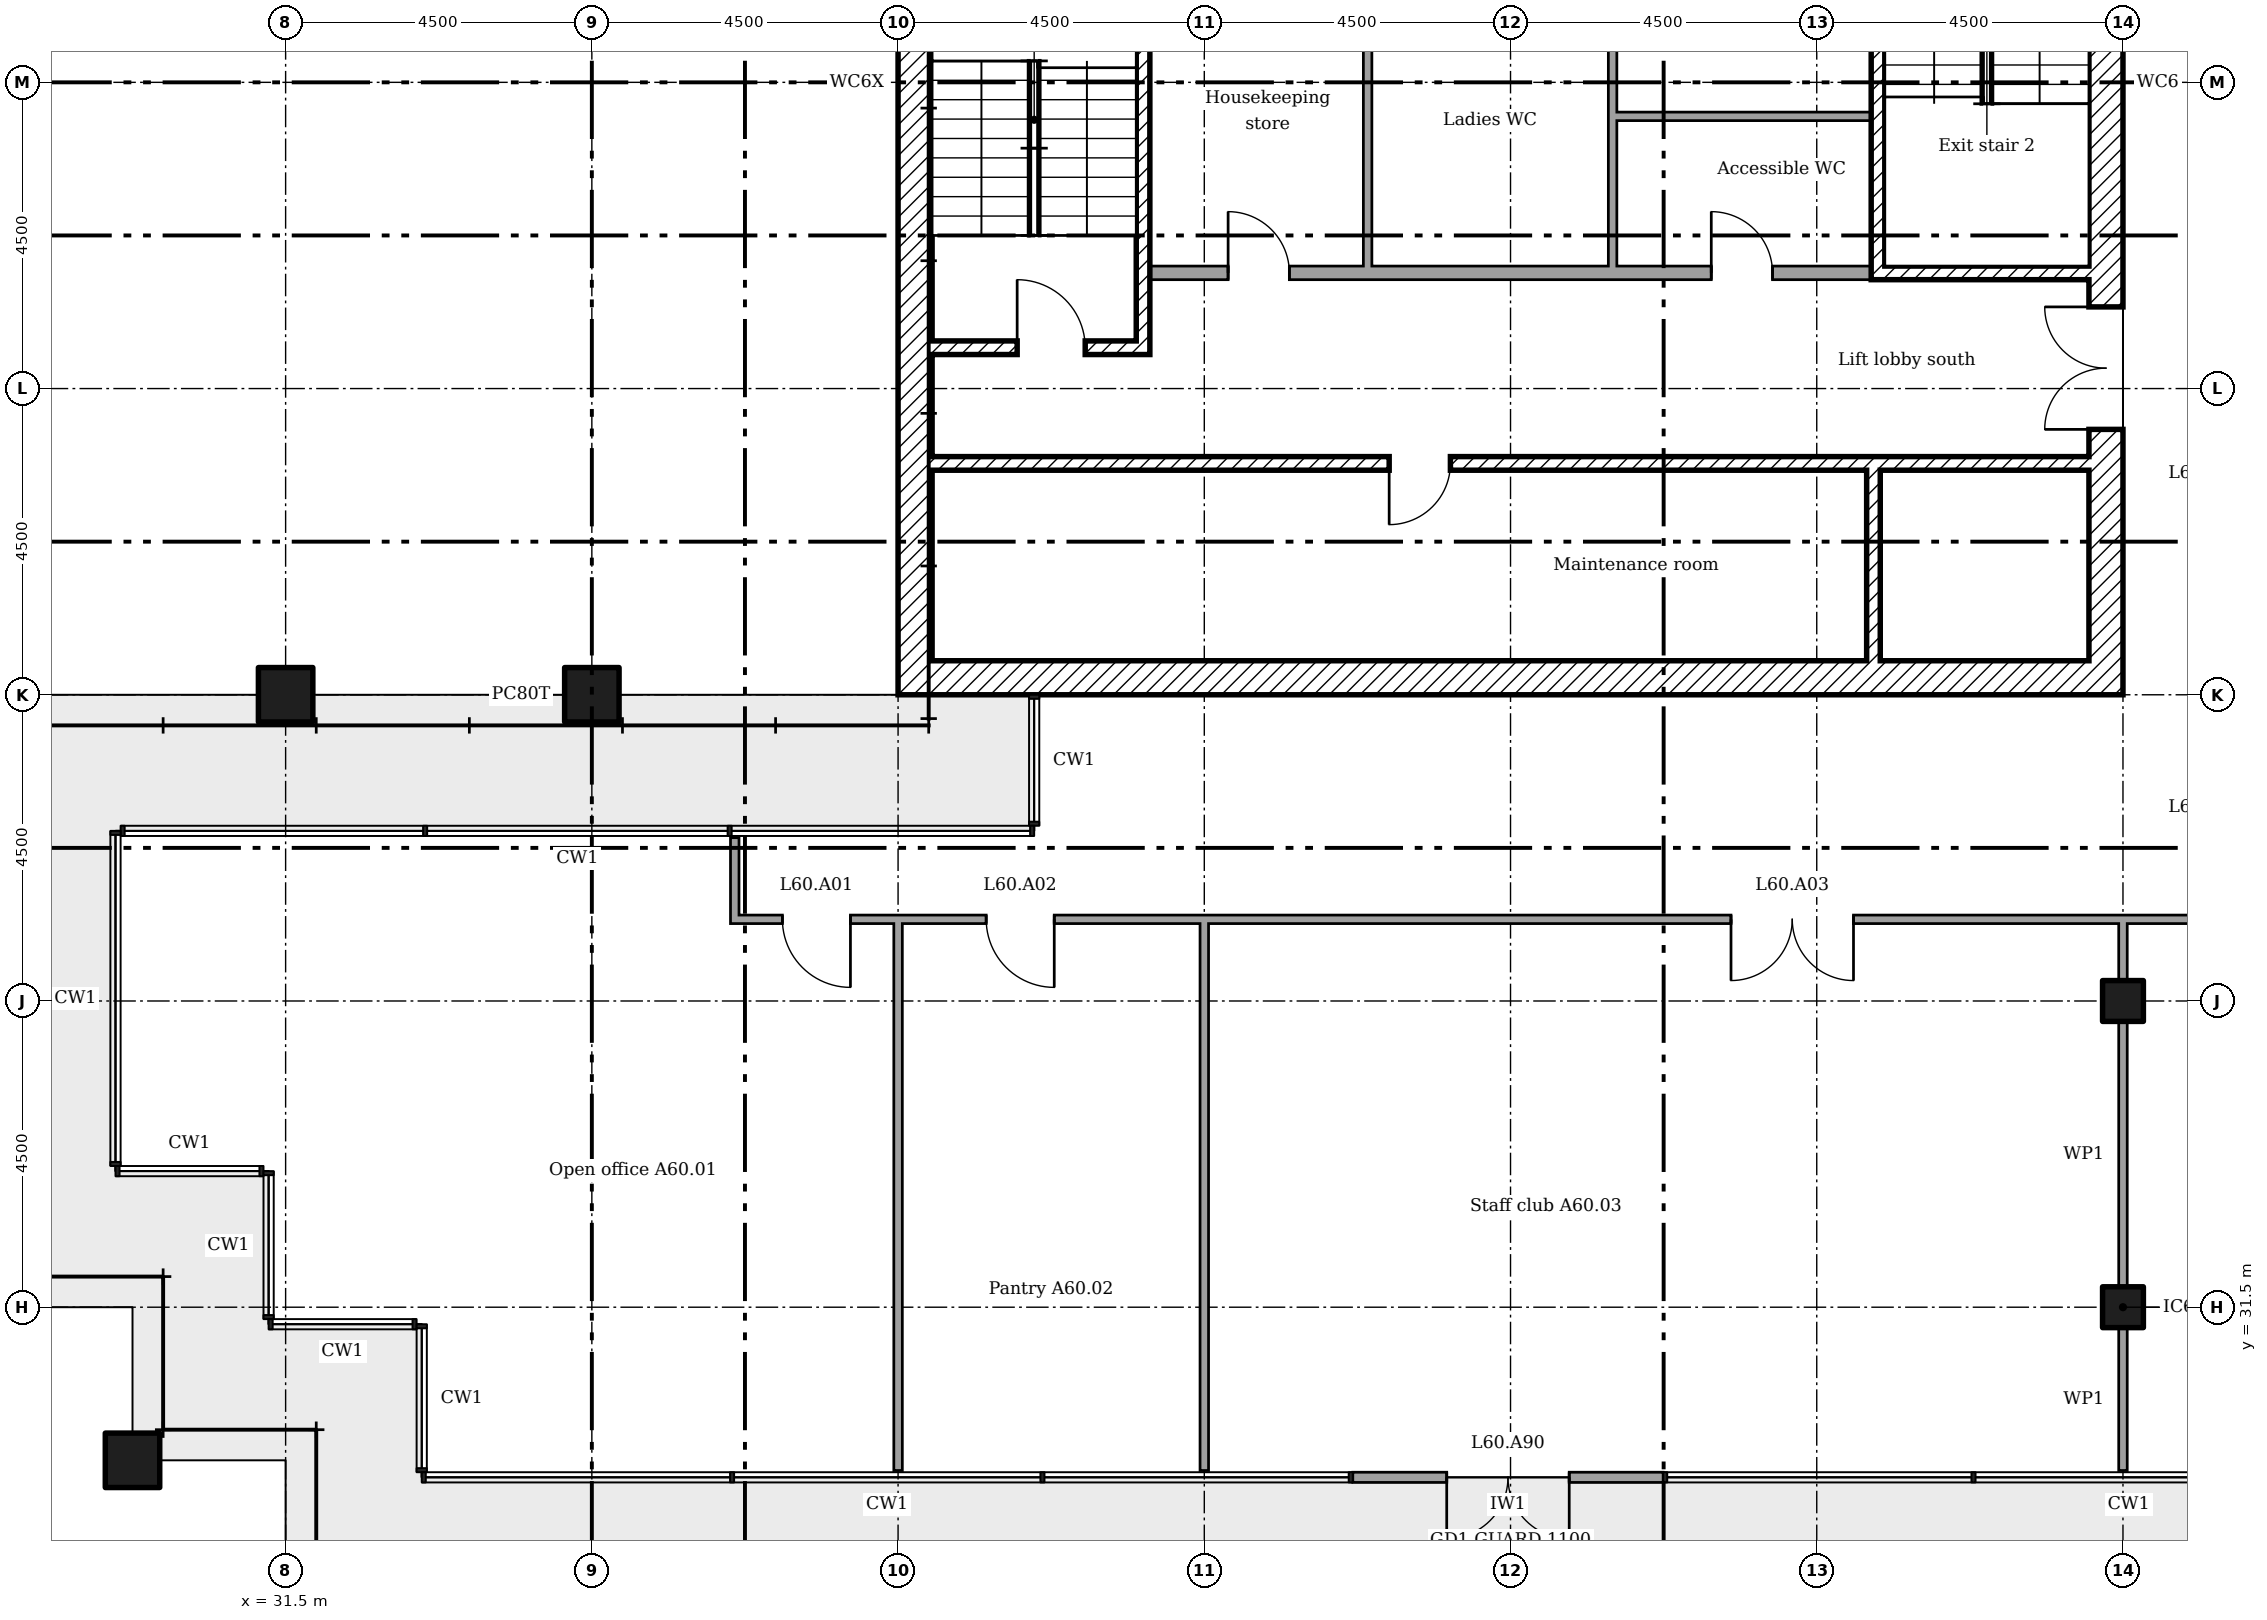
"""IFC4 building model, lengths in metres.
Left out: names, types, materials, properties, quantities, classifications, styles, units other than length and angle.
Written with IfcOpenShell. Run it as: python <this file> out.ifc"""

import sys

from ifc_helpers import new_model, si_unit, direction, frame, frame_2d, origin, origin_2d, place, context, subcontext, project, spatial, rectangle, extrude, element, fill, save


model = new_model("IFC4")
c1 = context("Model", 3, precision=1e-05, world=origin(), true_north=direction((0.0, 1.0)))
c2 = subcontext(c1, "Body", "Model", "MODEL_VIEW")
j1 = project(units=[si_unit("LENGTHUNIT", "METRE"), si_unit("PLANEANGLEUNIT", "RADIAN")], contexts=[c1])
p1 = place(None, origin())
s1 = spatial("IfcSite", under=j1, at=p1, CompositionType="ELEMENT")
p2 = place(p1, origin())
s2 = spatial("IfcBuilding", under=s1, at=p2, CompositionType="ELEMENT")
p3 = place(p2, frame((0.0, 0.0, 235.2)))
s3 = spatial("IfcBuildingStorey", under=s2, at=p3, CompositionType="ELEMENT", Elevation=235.2)
for number, where in (
    (1, (36.0, 40.5, 0.0)),
    (2, (31.5, 40.5, 0.0)),
    (3, (29.25, 29.25, 0.0)),
):
    element("IfcColumn", number, at=place(p3, frame(where)), inside=s3, PredefinedType="COLUMN", context=c2, shape_type="SweptSolid", body=[
        extrude(rectangle(XDim=0.8, YDim=0.8, at=origin_2d()), origin(), (0.0, 0.0, 1.0), 3.6),
    ])
for number, where in (
    (4, (58.5, 31.5, 0.0)),
    (5, (58.5, 36.0, 0.0)),
):
    element("IfcColumn", number, at=place(p3, frame(where)), inside=s3, PredefinedType="COLUMN", context=c2, shape_type="SweptSolid", body=[
        extrude(rectangle(XDim=0.6, YDim=0.6, at=origin_2d()), origin(), (0.0, 0.0, 1.0), 3.6),
    ])
p4 = place(p3, frame((47.182, 29.0, 0.0)))
e6 = element("IfcWall", 6, at=p4, inside=s3, PredefinedType="SOLIDWALL", context=c2, shape_type="SweptSolid", body=[
    extrude(rectangle(XDim=4.561, YDim=0.15, at=frame_2d((2.28, 0.0))), origin(), (0.0, 0.0, 1.0), 3.45),
])
p5 = place(p4, frame((1.38, 0.0, 0.0)))
e7 = element("IfcOpeningElement", 7, at=p5, cuts=e6, PredefinedType="OPENING", context=c2, shape_type="SweptSolid", body=[
    extrude(rectangle(XDim=1.8, YDim=2.4, at=frame_2d((0.9, 1.2))), frame((0.0, 0.085, 0.0), z_axis=(0.0, -1.0, 0.0), x_axis=(1.0, 0.0, 0.0)), (0.0, 0.0, 1.0), 0.17),
])
p6 = place(p3, frame((58.25, 40.5, 0.0), z_axis=(0.0, 0.0, 1.0), x_axis=(0.0, 1.0, 0.0)))
e8 = element("IfcWall", 8, at=p6, inside=s3, PredefinedType="SHEAR", context=c2, shape_type="SweptSolid", body=[
    extrude(rectangle(XDim=18.0, YDim=0.5, at=frame_2d((9.0, 0.0))), origin(), (0.0, 0.0, 1.0), 3.35),
])
p7 = place(p6, frame((13.15, 0.0, 0.0)))
e9 = element("IfcOpeningElement", 9, at=p7, cuts=e8, PredefinedType="OPENING", context=c2, shape_type="SweptSolid", body=[
    extrude(rectangle(XDim=1.2, YDim=2.1, at=frame_2d((0.6, 1.05))), frame((0.0, 0.26, 0.0), z_axis=(0.0, -1.0, 0.0), x_axis=(1.0, 0.0, 0.0)), (0.0, 0.0, 1.0), 0.52),
])
p8 = place(p6, frame((3.9, 0.0, 0.0)))
e10 = element("IfcOpeningElement", 10, at=p8, cuts=e8, PredefinedType="OPENING", context=c2, shape_type="SweptSolid", body=[
    extrude(rectangle(XDim=1.8, YDim=2.1, at=frame_2d((0.9, 1.05))), frame((0.0, 0.26, 0.0), z_axis=(0.0, -1.0, 0.0), x_axis=(1.0, 0.0, 0.0)), (0.0, 0.0, 1.0), 0.52),
])
p9 = place(p6, frame((11.525, 0.0, 0.0)))
e11 = element("IfcOpeningElement", 11, at=p9, cuts=e8, PredefinedType="OPENING", context=c2, shape_type="SweptSolid", body=[
    extrude(rectangle(XDim=1.0, YDim=2.1, at=frame_2d((0.5, 1.05))), frame((0.0, 0.26, 0.0), z_axis=(0.0, -1.0, 0.0), x_axis=(1.0, 0.0, 0.0)), (0.0, 0.0, 1.0), 0.52),
])
p10 = place(p3, frame((40.5, 40.75, 0.0)))
e12 = element("IfcWall", 12, at=p10, inside=s3, PredefinedType="SHEAR", context=c2, shape_type="SweptSolid", body=[
    extrude(rectangle(XDim=17.5, YDim=0.5, at=frame_2d((8.75, 0.0))), origin(), (0.0, 0.0, 1.0), 3.35),
])
p11 = place(p3, frame((40.75, 41.0, 0.0), z_axis=(0.0, 0.0, 1.0), x_axis=(0.0, 1.0, 0.0)))
e13 = element("IfcWall", 13, at=p11, inside=s3, PredefinedType="SHEAR", context=c2, shape_type="SweptSolid", body=[
    extrude(rectangle(XDim=17.0, YDim=0.5, at=frame_2d((8.5, 0.0))), origin(), (0.0, 0.0, 1.0), 3.35),
])
p12 = place(p3, frame((54.833, 41.0, 0.0), z_axis=(0.0, 0.0, 1.0), x_axis=(0.0, 1.0, 0.0)))
e14 = element("IfcWall", 14, at=p12, inside=s3, PredefinedType="SHEAR", context=c2, shape_type="SweptSolid", body=[
    extrude(rectangle(XDim=2.8, YDim=0.2, at=frame_2d((1.4, 0.0))), origin(), (0.0, 0.0, 1.0), 3.35),
])
p13 = place(p3, frame((41.0, 43.9, 0.0)))
e15 = element("IfcWall", 15, at=p13, inside=s3, PredefinedType="SHEAR", context=c2, shape_type="SweptSolid", body=[
    extrude(rectangle(XDim=17.0, YDim=0.2, at=frame_2d((8.5, 0.0))), origin(), (0.0, 0.0, 1.0), 3.35),
])
p14 = place(p13, frame((6.717, 0.0, 0.0)))
e16 = element("IfcOpeningElement", 16, at=p14, cuts=e15, PredefinedType="OPENING", context=c2, shape_type="SweptSolid", body=[
    extrude(rectangle(XDim=0.9, YDim=2.1, at=frame_2d((0.45, 1.05))), frame((0.0, 0.11, 0.0), z_axis=(0.0, -1.0, 0.0), x_axis=(1.0, 0.0, 0.0)), (0.0, 0.0, 1.0), 0.22),
])
p15 = place(p3, frame((44.1, 45.5, 0.0), z_axis=(0.0, 0.0, 1.0), x_axis=(0.0, 1.0, 0.0)))
e17 = element("IfcWall", 17, at=p15, inside=s3, PredefinedType="SHEAR", context=c2, shape_type="SweptSolid", body=[
    extrude(rectangle(XDim=6.9, YDim=0.2, at=frame_2d((3.45, 0.0))), origin(), (0.0, 0.0, 1.0), 3.35),
])
p16 = place(p3, frame((41.0, 45.6, 0.0)))
e18 = element("IfcWall", 18, at=p16, inside=s3, PredefinedType="SHEAR", context=c2, shape_type="SweptSolid", body=[
    extrude(rectangle(XDim=3.0, YDim=0.2, at=frame_2d((1.5, 0.0))), origin(), (0.0, 0.0, 1.0), 3.35),
])
p17 = place(p16, frame((1.25, 0.0, 0.0)))
e19 = element("IfcOpeningElement", 19, at=p17, cuts=e18, PredefinedType="OPENING", context=c2, shape_type="SweptSolid", body=[
    extrude(rectangle(XDim=1.0, YDim=2.1, at=frame_2d((0.5, 1.05))), frame((0.0, 0.11, 0.0), z_axis=(0.0, -1.0, 0.0), x_axis=(1.0, 0.0, 0.0)), (0.0, 0.0, 1.0), 0.22),
])
p18 = place(p3, frame((54.8, 46.7, 0.0)))
e20 = element("IfcWall", 20, at=p18, inside=s3, PredefinedType="SHEAR", context=c2, shape_type="SweptSolid", body=[
    extrude(rectangle(XDim=3.2, YDim=0.2, at=frame_2d((1.6, 0.0))), origin(), (0.0, 0.0, 1.0), 3.35),
])
p19 = place(p3, frame((54.9, 46.8, 0.0), z_axis=(0.0, 0.0, 1.0), x_axis=(0.0, 1.0, 0.0)))
e21 = element("IfcWall", 21, at=p19, inside=s3, PredefinedType="SHEAR", context=c2, shape_type="SweptSolid", body=[
    extrude(rectangle(XDim=6.5, YDim=0.2, at=frame_2d((3.25, 0.0))), origin(), (0.0, 0.0, 1.0), 3.35),
])
p20 = place(p3, frame((44.2, 46.7, 0.0)))
e22 = element("IfcWall", 22, at=p20, inside=s3, PredefinedType="PARTITIONING", context=c2, shape_type="SweptSolid", body=[
    extrude(rectangle(XDim=10.6, YDim=0.2, at=frame_2d((5.3, 0.0))), origin(), (0.0, 0.0, 1.0), 3.35),
])
p21 = place(p20, frame((1.15, 0.0, 0.0)))
e23 = element("IfcOpeningElement", 23, at=p21, cuts=e22, PredefinedType="OPENING", context=c2, shape_type="SweptSolid", body=[
    extrude(rectangle(XDim=0.9, YDim=2.1, at=frame_2d((0.45, 1.05))), frame((0.0, 0.11, 0.0), z_axis=(0.0, -1.0, 0.0), x_axis=(1.0, 0.0, 0.0)), (0.0, 0.0, 1.0), 0.22),
])
p22 = place(p20, frame((8.25, 0.0, 0.0)))
e24 = element("IfcOpeningElement", 24, at=p22, cuts=e22, PredefinedType="OPENING", context=c2, shape_type="SweptSolid", body=[
    extrude(rectangle(XDim=0.9, YDim=2.1, at=frame_2d((0.45, 1.05))), frame((0.0, 0.11, 0.0), z_axis=(0.0, -1.0, 0.0), x_axis=(1.0, 0.0, 0.0)), (0.0, 0.0, 1.0), 0.22),
])
p23 = place(p3, frame((47.4, 46.8, 0.0), z_axis=(0.0, 0.0, 1.0), x_axis=(0.0, 1.0, 0.0)))
e25 = element("IfcWall", 25, at=p23, inside=s3, PredefinedType="PARTITIONING", context=c2, shape_type="SweptSolid", body=[
    extrude(rectangle(XDim=5.0, YDim=0.125, at=frame_2d((2.5, 0.0))), origin(), (0.0, 0.0, 1.0), 3.35),
])
p24 = place(p3, frame((51.0, 46.8, 0.0), z_axis=(0.0, 0.0, 1.0), x_axis=(0.0, 1.0, 0.0)))
e26 = element("IfcWall", 26, at=p24, inside=s3, PredefinedType="PARTITIONING", context=c2, shape_type="SweptSolid", body=[
    extrude(rectangle(XDim=2.262, YDim=0.125, at=frame_2d((1.131, 0.0))), origin(), (0.0, 0.0, 1.0), 3.35),
])
p25 = place(p3, frame((54.8, 49.0, 0.0), z_axis=(0.0, 0.0, 1.0), x_axis=(-1.0, 0.0, 0.0)))
e27 = element("IfcWall", 27, at=p25, inside=s3, PredefinedType="PARTITIONING", context=c2, shape_type="SweptSolid", body=[
    extrude(rectangle(XDim=3.738, YDim=0.125, at=frame_2d((1.869, 0.0))), origin(), (0.0, 0.0, 1.0), 3.35),
])
p26 = place(p3, frame((51.0, 49.0, 0.0), z_axis=(0.0, 0.0, 1.0), x_axis=(0.0, 1.0, 0.0)))
e28 = element("IfcWall", 28, at=p26, inside=s3, PredefinedType="PARTITIONING", context=c2, shape_type="SweptSolid", body=[
    extrude(rectangle(XDim=2.8, YDim=0.125, at=frame_2d((1.4, 0.0))), origin(), (0.0, 0.0, 1.0), 3.35),
])
p27 = place(p3, frame((38.038, 37.2, 0.0)))
e29 = element("IfcWall", 29, at=p27, inside=s3, PredefinedType="PARTITIONING", context=c2, shape_type="SweptSolid", body=[
    extrude(rectangle(XDim=22.625, YDim=0.125, at=frame_2d((11.312, 0.0))), origin(), (0.0, 0.0, 1.0), 3.45),
])
p28 = place(p27, frame((0.762, 0.0, 0.0)))
e30 = element("IfcOpeningElement", 30, at=p28, cuts=e29, PredefinedType="OPENING", context=c2, shape_type="SweptSolid", body=[
    extrude(rectangle(XDim=1.0, YDim=2.1, at=frame_2d((0.5, 1.05))), frame((0.0, 0.073, 0.0), z_axis=(0.0, -1.0, 0.0), x_axis=(1.0, 0.0, 0.0)), (0.0, 0.0, 1.0), 0.145),
])
p29 = place(p27, frame((3.758, 0.0, 0.0)))
e31 = element("IfcOpeningElement", 31, at=p29, cuts=e29, PredefinedType="OPENING", context=c2, shape_type="SweptSolid", body=[
    extrude(rectangle(XDim=1.0, YDim=2.1, at=frame_2d((0.5, 1.05))), frame((0.0, 0.073, 0.0), z_axis=(0.0, -1.0, 0.0), x_axis=(1.0, 0.0, 0.0)), (0.0, 0.0, 1.0), 0.145),
])
p30 = place(p27, frame((14.702, 0.0, 0.0)))
e32 = element("IfcOpeningElement", 32, at=p30, cuts=e29, PredefinedType="OPENING", context=c2, shape_type="SweptSolid", body=[
    extrude(rectangle(XDim=1.8, YDim=2.1, at=frame_2d((0.9, 1.05))), frame((0.0, 0.073, 0.0), z_axis=(0.0, -1.0, 0.0), x_axis=(1.0, 0.0, 0.0)), (0.0, 0.0, 1.0), 0.145),
])
p31 = place(p3, frame((38.1, 37.262, 0.0), z_axis=(0.0, 0.0, 1.0), x_axis=(0.0, 1.0, 0.0)))
e33 = element("IfcWall", 33, at=p31, inside=s3, PredefinedType="PARTITIONING", context=c2, shape_type="SweptSolid", body=[
    extrude(rectangle(XDim=1.137, YDim=0.125, at=frame_2d((0.569, 0.0))), origin(), (0.0, 0.0, 1.0), 3.45),
])
for number, where, z_axis, x_axis in (
    (34, (40.5, 29.1, 0.0), (0.0, 0.0, 1.0), (0.0, 1.0, 0.0)),
    (35, (45.0, 29.1, 0.0), (0.0, 0.0, 1.0), (0.0, 1.0, 0.0)),
):
    element("IfcWall", number, at=place(p3, frame(where, z_axis=z_axis, x_axis=x_axis)), inside=s3, PredefinedType="PARTITIONING", context=c2, shape_type="SweptSolid", body=[
        extrude(rectangle(XDim=8.1, YDim=0.125, at=frame_2d((4.05, 0.0))), origin(), (0.0, 0.0, 1.0), 2.772),
    ])
p32 = place(p3, frame((58.5, 29.1, 0.0), z_axis=(0.0, 0.0, 1.0), x_axis=(0.0, 1.0, 0.0)))
e36 = element("IfcWall", 36, at=p32, inside=s3, PredefinedType="PARTITIONING", context=c2, shape_type="SweptSolid", body=[
    extrude(rectangle(XDim=2.1, YDim=0.125, at=frame_2d((1.05, 0.0))), origin(), (0.0, 0.0, 1.0), 2.676),
])
p33 = place(p3, frame((58.5, 31.8, 0.0), z_axis=(0.0, 0.0, 1.0), x_axis=(0.0, 1.0, 0.0)))
e37 = element("IfcWall", 37, at=p33, inside=s3, PredefinedType="PARTITIONING", context=c2, shape_type="SweptSolid", body=[
    extrude(rectangle(XDim=3.9, YDim=0.125, at=frame_2d((1.95, 0.0))), origin(), (0.0, 0.0, 1.0), 2.676),
])
p34 = place(p3, frame((58.5, 36.3, 0.0), z_axis=(0.0, 0.0, 1.0), x_axis=(0.0, 1.0, 0.0)))
e38 = element("IfcWall", 38, at=p34, inside=s3, PredefinedType="PARTITIONING", context=c2, shape_type="SweptSolid", body=[
    extrude(rectangle(XDim=0.9, YDim=0.125, at=frame_2d((0.45, 0.0))), origin(), (0.0, 0.0, 1.0), 2.676),
])
p35 = place(p5, frame((1.8, 0.0, 0.0), x_axis=(-1.0, 0.0, 0.0)))
e39 = element("IfcDoor", 39, at=p35, inside=s3, OperationType="DOUBLE_DOOR_DOUBLE_SWING", PredefinedType="NOTDEFINED", context=c2, shape_type="SweptSolid", body=[
    extrude(rectangle(XDim=1.8, YDim=2.4, at=frame_2d((0.9, 1.2))), frame((0.0, 0.025, 0.0), z_axis=(0.0, -1.0, 0.0), x_axis=(1.0, 0.0, 0.0)), (0.0, 0.0, 1.0), 0.05),
])
fill(e7, e39)
p36 = place(p8, origin())
e40 = element("IfcDoor", 40, at=p36, inside=s3, OperationType="DOUBLE_DOOR_SINGLE_SWING", PredefinedType="DOOR", context=c2, shape_type="SweptSolid", body=[
    extrude(rectangle(XDim=1.8, YDim=2.1, at=frame_2d((0.9, 1.05))), frame((0.0, 0.025, 0.0), z_axis=(0.0, -1.0, 0.0), x_axis=(1.0, 0.0, 0.0)), (0.0, 0.0, 1.0), 0.05),
])
fill(e10, e40)
p37 = place(p17, origin())
e41 = element("IfcDoor", 41, at=p37, inside=s3, OperationType="SINGLE_SWING_RIGHT", PredefinedType="DOOR", context=c2, shape_type="SweptSolid", body=[
    extrude(rectangle(XDim=1.0, YDim=2.1, at=frame_2d((0.5, 1.05))), frame((0.0, 0.025, 0.0), z_axis=(0.0, -1.0, 0.0), x_axis=(1.0, 0.0, 0.0)), (0.0, 0.0, 1.0), 0.05),
])
fill(e19, e41)
p38 = place(p14, frame((0.9, 0.0, 0.0), x_axis=(-1.0, 0.0, 0.0)))
e42 = element("IfcDoor", 42, at=p38, inside=s3, OperationType="SINGLE_SWING_LEFT", PredefinedType="DOOR", context=c2, shape_type="SweptSolid", body=[
    extrude(rectangle(XDim=0.9, YDim=2.1, at=frame_2d((0.45, 1.05))), frame((0.0, 0.025, 0.0), z_axis=(0.0, -1.0, 0.0), x_axis=(1.0, 0.0, 0.0)), (0.0, 0.0, 1.0), 0.05),
])
fill(e16, e42)
p39 = place(p21, origin())
e43 = element("IfcDoor", 43, at=p39, inside=s3, OperationType="SINGLE_SWING_RIGHT", PredefinedType="DOOR", context=c2, shape_type="SweptSolid", body=[
    extrude(rectangle(XDim=0.9, YDim=2.1, at=frame_2d((0.45, 1.05))), frame((0.0, 0.025, 0.0), z_axis=(0.0, -1.0, 0.0), x_axis=(1.0, 0.0, 0.0)), (0.0, 0.0, 1.0), 0.05),
])
fill(e23, e43)
p40 = place(p22, origin())
e44 = element("IfcDoor", 44, at=p40, inside=s3, OperationType="SINGLE_SWING_RIGHT", PredefinedType="DOOR", context=c2, shape_type="SweptSolid", body=[
    extrude(rectangle(XDim=0.9, YDim=2.1, at=frame_2d((0.45, 1.05))), frame((0.0, 0.025, 0.0), z_axis=(0.0, -1.0, 0.0), x_axis=(1.0, 0.0, 0.0)), (0.0, 0.0, 1.0), 0.05),
])
fill(e24, e44)
p41 = place(p28, frame((1.0, 0.0, 0.0), x_axis=(-1.0, 0.0, 0.0)))
e45 = element("IfcDoor", 45, at=p41, inside=s3, OperationType="SINGLE_SWING_RIGHT", PredefinedType="DOOR", context=c2, shape_type="SweptSolid", body=[
    extrude(rectangle(XDim=1.0, YDim=2.1, at=frame_2d((0.5, 1.05))), frame((0.0, 0.025, 0.0), z_axis=(0.0, -1.0, 0.0), x_axis=(1.0, 0.0, 0.0)), (0.0, 0.0, 1.0), 0.05),
])
fill(e30, e45)
p42 = place(p29, frame((1.0, 0.0, 0.0), x_axis=(-1.0, 0.0, 0.0)))
e46 = element("IfcDoor", 46, at=p42, inside=s3, OperationType="SINGLE_SWING_RIGHT", PredefinedType="DOOR", context=c2, shape_type="SweptSolid", body=[
    extrude(rectangle(XDim=1.0, YDim=2.1, at=frame_2d((0.5, 1.05))), frame((0.0, 0.025, 0.0), z_axis=(0.0, -1.0, 0.0), x_axis=(1.0, 0.0, 0.0)), (0.0, 0.0, 1.0), 0.05),
])
fill(e31, e46)
p43 = place(p30, frame((1.8, 0.0, 0.0), x_axis=(-1.0, 0.0, 0.0)))
e47 = element("IfcDoor", 47, at=p43, inside=s3, OperationType="DOUBLE_DOOR_SINGLE_SWING", PredefinedType="DOOR", context=c2, shape_type="SweptSolid", body=[
    extrude(rectangle(XDim=1.8, YDim=2.1, at=frame_2d((0.9, 1.05))), frame((0.0, 0.025, 0.0), z_axis=(0.0, -1.0, 0.0), x_axis=(1.0, 0.0, 0.0)), (0.0, 0.0, 1.0), 0.05),
])
fill(e32, e47)
save(model, sys.argv[1])
